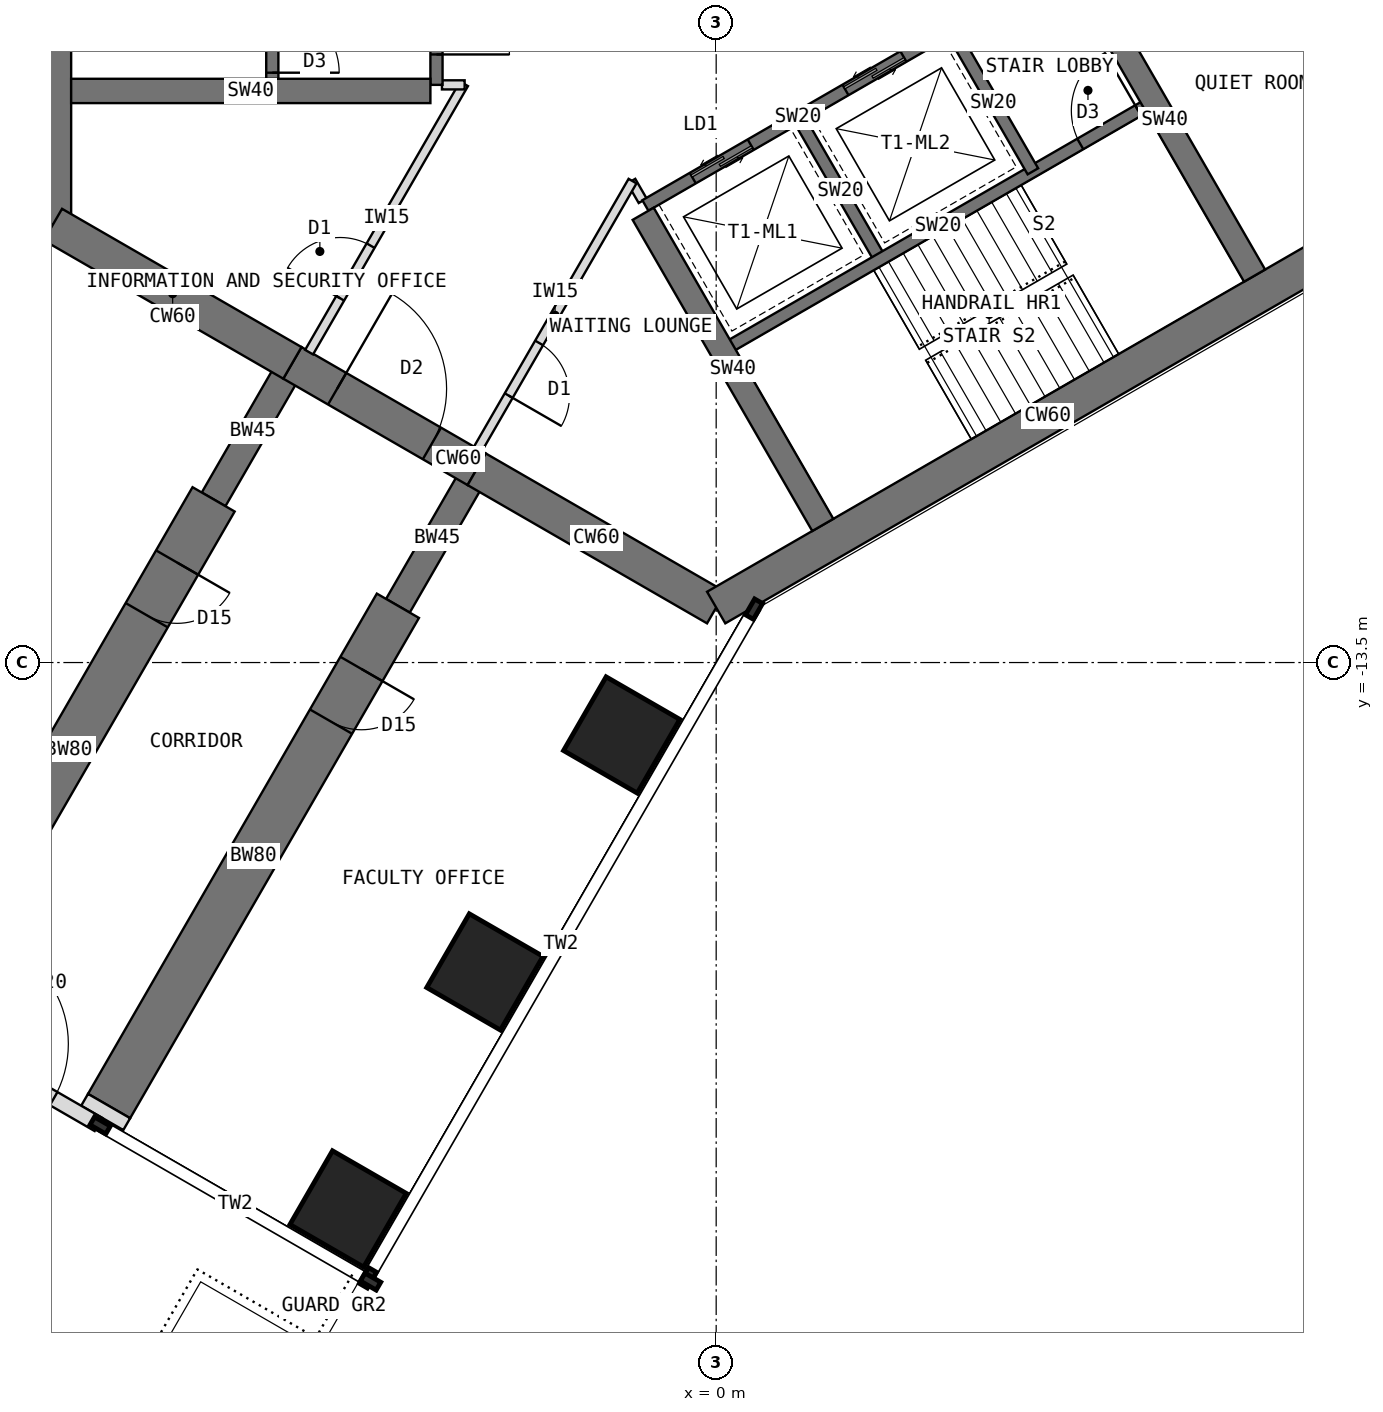
"""IFC4 building model, lengths in metres.
Left out: names, types, materials, properties, quantities, classifications, styles, units other than length and angle.
Written with IfcOpenShell. Run it as: python <this file> out.ifc"""

import sys

from ifc_helpers import new_model, si_unit, direction, frame, frame_2d, origin, origin_2d, place, context, subcontext, project, spatial, rectangle, extrude, element, fill, save


model = new_model("IFC4")
c1 = context("Model", 3, precision=1e-05, world=origin(), true_north=direction((0.0, 1.0)))
c2 = subcontext(c1, "Body", "Model", "MODEL_VIEW")
j1 = project(units=[si_unit("LENGTHUNIT", "METRE"), si_unit("PLANEANGLEUNIT", "RADIAN")], contexts=[c1])
p1 = place(None, origin())
s1 = spatial("IfcSite", under=j1, at=p1, CompositionType="ELEMENT")
p2 = place(p1, origin())
s2 = spatial("IfcBuilding", under=s1, at=p2, CompositionType="ELEMENT")
p3 = place(p2, frame((0.0, 0.0, 97.5)))
s3 = spatial("IfcBuildingStorey", under=s2, at=p3, CompositionType="ELEMENT", Elevation=97.5)
p4 = place(p3, frame((-10.908, 6.298, 0.0), z_axis=(0.0, 0.0, 1.0), x_axis=(0.0, -1.0, 0.0)))
e1 = element("IfcWall", 1, at=p4, inside=s3, PredefinedType="SHEAR", context=c2, shape_type="SweptSolid", body=[
    extrude(rectangle(XDim=12.596, YDim=0.6, at=frame_2d((6.298, 0.0))), origin(), (0.0, 0.0, 1.0), 4.0),
])
p5 = place(p3, frame((-10.908, -6.298, 0.0), z_axis=(0.0, 0.0, 1.0), x_axis=(0.866034513004, -0.499984222037, 0.0)))
e2 = element("IfcWall", 2, at=p5, inside=s3, PredefinedType="SHEAR", context=c2, shape_type="SweptSolid", body=[
    extrude(rectangle(XDim=4.548, YDim=0.6, at=frame_2d((2.274, 0.0))), origin(), (0.0, 0.0, 1.0), 4.0),
])
p6 = place(p3, frame((-6.97, -8.572, 0.0), z_axis=(0.0, 0.0, 1.0), x_axis=(0.866019471182, -0.500010275428, 0.0)))
e3 = element("IfcWall", 3, at=p6, inside=s3, PredefinedType="SHEAR", context=c2, shape_type="SweptSolid", body=[
    extrude(rectangle(XDim=3.5, YDim=0.6, at=frame_2d((1.75, 0.0))), origin(), (0.0, 0.0, 1.0), 4.0),
])
p7 = place(p6, frame((0.85, 0.0, 0.0)))
e4 = element("IfcOpeningElement", 4, at=p7, cuts=e3, PredefinedType="OPENING", context=c2, shape_type="SweptSolid", body=[
    extrude(rectangle(XDim=1.8, YDim=2.1, at=frame_2d((0.9, 1.05))), frame((0.0, 0.31, 0.0), z_axis=(0.0, -1.0, 0.0), x_axis=(1.0, 0.0, 0.0)), (0.0, 0.0, 1.0), 0.62),
])
p8 = place(p3, frame((-3.939, -10.322, 0.0), z_axis=(0.0, 0.0, 1.0), x_axis=(0.866011268655, -0.500024481964, 0.0)))
e5 = element("IfcWall", 5, at=p8, inside=s3, PredefinedType="SHEAR", context=c2, shape_type="SweptSolid", body=[
    extrude(rectangle(XDim=4.548, YDim=0.6, at=frame_2d((2.274, 0.0))), origin(), (0.0, 0.0, 1.0), 4.0),
])
p9 = place(p3, frame((0.0, -12.596, 0.0), z_axis=(0.0, 0.0, 1.0), x_axis=(0.866021940709, 0.500005998175, 0.0)))
e6 = element("IfcWall", 6, at=p9, inside=s3, PredefinedType="SHEAR", context=c2, shape_type="SweptSolid", body=[
    extrude(rectangle(XDim=12.596, YDim=0.6, at=frame_2d((6.298, 0.0))), origin(), (0.0, 0.0, 1.0), 4.0),
])
p10 = place(p3, frame((-3.939, -10.322, 0.0), z_axis=(0.0, 0.0, 1.0), x_axis=(-0.499918158782, -0.866072649678, 0.0)))
e7 = element("IfcWall", 7, at=p10, inside=s3, PredefinedType="SHEAR", context=c2, shape_type="SweptSolid", body=[
    extrude(rectangle(XDim=2.592, YDim=0.45, at=frame_2d((1.296, 0.0))), origin(), (0.0, 0.0, 1.0), 4.0),
])
p11 = place(p3, frame((-5.234, -12.566, 0.0), z_axis=(0.0, 0.0, 1.0), x_axis=(-0.499997557548, -0.86602681393, 0.0)))
e8 = element("IfcWall", 8, at=p11, inside=s3, PredefinedType="SHEAR", context=c2, shape_type="SweptSolid", body=[
    extrude(rectangle(XDim=9.5, YDim=0.8, at=frame_2d((4.75, 0.0))), origin(), (0.0, 0.0, 1.0), 4.0),
])
p12 = place(p11, frame((1.2, 0.0, 0.0)))
e9 = element("IfcOpeningElement", 9, at=p12, cuts=e8, PredefinedType="OPENING", context=c2, shape_type="SweptSolid", body=[
    extrude(rectangle(XDim=1.0, YDim=2.1, at=frame_2d((0.5, 1.05))), frame((0.0, 0.41, 0.0), z_axis=(0.0, -1.0, 0.0), x_axis=(1.0, 0.0, 0.0)), (0.0, 0.0, 1.0), 0.82),
])
p13 = place(p3, frame((-6.97, -8.572, 0.0), z_axis=(0.0, 0.0, 1.0), x_axis=(-0.499988811324, -0.866031863473, 0.0)))
e10 = element("IfcWall", 10, at=p13, inside=s3, PredefinedType="SHEAR", context=c2, shape_type="SweptSolid", body=[
    extrude(rectangle(XDim=2.592, YDim=0.45, at=frame_2d((1.296, 0.0))), origin(), (0.0, 0.0, 1.0), 4.0),
])
p14 = place(p3, frame((-8.266, -10.816, 0.0), z_axis=(0.0, 0.0, 1.0), x_axis=(-0.499997557548, -0.86602681393, 0.0)))
e11 = element("IfcWall", 11, at=p14, inside=s3, PredefinedType="SHEAR", context=c2, shape_type="SweptSolid", body=[
    extrude(rectangle(XDim=9.5, YDim=0.8, at=frame_2d((4.75, 0.0))), origin(), (0.0, 0.0, 1.0), 4.0),
])
p15 = place(p14, frame((1.2, 0.0, 0.0)))
e12 = element("IfcOpeningElement", 12, at=p15, cuts=e11, PredefinedType="OPENING", context=c2, shape_type="SweptSolid", body=[
    extrude(rectangle(XDim=1.0, YDim=2.1, at=frame_2d((0.5, 1.05))), frame((0.0, 0.41, 0.0), z_axis=(0.0, -1.0, 0.0), x_axis=(1.0, 0.0, 0.0)), (0.0, 0.0, 1.0), 0.82),
])
for number, where, z_axis, x_axis in (
    (13, (-1.554, -14.691, 0.0), (0.0, 0.0, 1.0), (0.5, 0.866, 0.0)),
    (14, (-3.804, -18.588, 0.0), (0.0, 0.0, 1.0), (0.5, 0.866, 0.0)),
    (15, (-6.054, -22.486, 0.0), (0.0, 0.0, 1.0), (0.5, 0.866, 0.0)),
):
    element("IfcColumn", number, at=place(p3, frame(where, z_axis=z_axis, x_axis=x_axis)), inside=s3, PredefinedType="COLUMN", context=c2, shape_type="SweptSolid", body=[
        extrude(rectangle(XDim=1.4, YDim=1.4, at=origin_2d()), origin(), (0.0, 0.0, 1.0), 4.0),
    ])
p16 = place(p3, frame((-13.19, -19.347, 0.0), z_axis=(0.0, 0.0, 1.0), x_axis=(0.866019471182, -0.500010275428, 0.0)))
e16 = element("IfcWall", 16, at=p16, inside=s3, PredefinedType="STANDARD", context=c2, shape_type="SweptSolid", body=[
    extrude(rectangle(XDim=3.5, YDim=0.25, at=frame_2d((1.75, 0.0))), origin(), (0.0, 0.0, 1.0), 3.8),
])
p17 = place(p16, frame((0.85, 0.0, 0.0)))
e17 = element("IfcOpeningElement", 17, at=p17, cuts=e16, PredefinedType="OPENING", context=c2, shape_type="SweptSolid", body=[
    extrude(rectangle(XDim=1.8, YDim=2.4, at=frame_2d((0.9, 1.2))), frame((0.0, 0.135, 0.0), z_axis=(0.0, -1.0, 0.0), x_axis=(1.0, 0.0, 0.0)), (0.0, 0.0, 1.0), 0.27),
])
p18 = place(p3, frame((-9.984, -20.794, 0.0), z_axis=(0.0, 0.0, 1.0), x_axis=(-0.500223362819, -0.865896406789, 0.0)))
e18 = element("IfcWall", 18, at=p18, inside=s3, PredefinedType="PARTITIONING", context=c2, shape_type="SweptSolid", body=[
    extrude(rectangle(XDim=0.225, YDim=0.8, at=frame_2d((0.113, 0.0))), origin(), (0.0, 0.0, 1.0), 3.8),
])
p19 = place(p3, frame((-4.6, 4.0, 0.0), z_axis=(0.0, 0.0, 1.0), x_axis=(0.0, -1.0, 0.0)))
e19 = element("IfcWall", 19, at=p19, inside=s3, PredefinedType="SHEAR", context=c2, shape_type="SweptSolid", body=[
    extrude(rectangle(XDim=8.0, YDim=0.2, at=frame_2d((4.0, 0.0))), origin(), (0.0, 0.0, 1.0), 4.0),
])
p20 = place(p19, frame((6.3, 0.0, 0.0)))
e20 = element("IfcOpeningElement", 20, at=p20, cuts=e19, PredefinedType="OPENING", context=c2, shape_type="SweptSolid", body=[
    extrude(rectangle(XDim=1.2, YDim=2.1, at=frame_2d((0.6, 1.05))), frame((0.0, 0.11, 0.0), z_axis=(0.0, -1.0, 0.0), x_axis=(1.0, 0.0, 0.0)), (0.0, 0.0, 1.0), 0.22),
])
p21 = place(p19, frame((0.9, 0.0, 0.0)))
e21 = element("IfcOpeningElement", 21, at=p21, cuts=e19, PredefinedType="OPENING", context=c2, shape_type="SweptSolid", body=[
    extrude(rectangle(XDim=1.1, YDim=2.2, at=frame_2d((0.55, 1.1))), frame((0.0, 0.11, 0.0), z_axis=(0.0, -1.0, 0.0), x_axis=(1.0, 0.0, 0.0)), (0.0, 0.0, 1.0), 0.22),
])
p22 = place(p3, frame((-7.3, 4.0, 0.0), z_axis=(0.0, 0.0, 1.0), x_axis=(0.0, -1.0, 0.0)))
e22 = element("IfcWall", 22, at=p22, inside=s3, PredefinedType="SHEAR", context=c2, shape_type="SweptSolid", body=[
    extrude(rectangle(XDim=8.0, YDim=0.2, at=frame_2d((4.0, 0.0))), origin(), (0.0, 0.0, 1.0), 4.0),
])
p23 = place(p22, frame((6.7, 0.0, 0.0)))
e23 = element("IfcOpeningElement", 23, at=p23, cuts=e22, PredefinedType="OPENING", context=c2, shape_type="SweptSolid", body=[
    extrude(rectangle(XDim=1.1, YDim=2.1, at=frame_2d((0.55, 1.05))), frame((0.0, 0.11, 0.0), z_axis=(0.0, -1.0, 0.0), x_axis=(1.0, 0.0, 0.0)), (0.0, 0.0, 1.0), 0.22),
])
p24 = place(p3, frame((-4.7, -4.1, 0.0), z_axis=(0.0, 0.0, 1.0), x_axis=(-1.0, 0.0, 0.0)))
e24 = element("IfcWall", 24, at=p24, inside=s3, PredefinedType="SHEAR", context=c2, shape_type="SweptSolid", body=[
    extrude(rectangle(XDim=5.908, YDim=0.4, at=frame_2d((2.954, 0.0))), origin(), (0.0, 0.0, 1.0), 4.0),
])
p25 = place(p3, frame((-1.164, -5.984, 0.0), z_axis=(0.0, 0.0, 1.0), x_axis=(0.866026010844, 0.49999894854, 0.0)))
e25 = element("IfcWall", 25, at=p25, inside=s3, PredefinedType="SHEAR", context=c2, shape_type="SweptSolid", body=[
    extrude(rectangle(XDim=8.0, YDim=0.2, at=frame_2d((4.0, 0.0))), origin(), (0.0, 0.0, 1.0), 4.0),
])
p26 = place(p25, frame((6.3, 0.0, 0.0)))
e26 = element("IfcOpeningElement", 26, at=p26, cuts=e25, PredefinedType="OPENING", context=c2, shape_type="SweptSolid", body=[
    extrude(rectangle(XDim=1.2, YDim=2.1, at=frame_2d((0.6, 1.05))), frame((0.0, 0.11, 0.0), z_axis=(0.0, -1.0, 0.0), x_axis=(1.0, 0.0, 0.0)), (0.0, 0.0, 1.0), 0.22),
])
p27 = place(p25, frame((0.9, 0.0, 0.0)))
e27 = element("IfcOpeningElement", 27, at=p27, cuts=e25, PredefinedType="OPENING", context=c2, shape_type="SweptSolid", body=[
    extrude(rectangle(XDim=1.1, YDim=2.2, at=frame_2d((0.55, 1.1))), frame((0.0, 0.11, 0.0), z_axis=(0.0, -1.0, 0.0), x_axis=(1.0, 0.0, 0.0)), (0.0, 0.0, 1.0), 0.22),
])
p28 = place(p25, frame((3.8, 0.0, 0.0)))
e28 = element("IfcOpeningElement", 28, at=p28, cuts=e25, PredefinedType="OPENING", context=c2, shape_type="SweptSolid", body=[
    extrude(rectangle(XDim=1.1, YDim=2.2, at=frame_2d((0.55, 1.1))), frame((0.0, 0.11, 0.0), z_axis=(0.0, -1.0, 0.0), x_axis=(1.0, 0.0, 0.0)), (0.0, 0.0, 1.0), 0.22),
])
p29 = place(p3, frame((1.397, -4.62, 0.0), z_axis=(0.0, 0.0, 1.0), x_axis=(0.499936506574, -0.866062058628, 0.0)))
e29 = element("IfcWall", 29, at=p29, inside=s3, PredefinedType="SHEAR", context=c2, shape_type="SweptSolid", body=[
    extrude(rectangle(XDim=2.6, YDim=0.2, at=frame_2d((1.3, 0.0))), origin(), (0.0, 0.0, 1.0), 4.0),
])
p30 = place(p3, frame((3.909, -3.17, 0.0), z_axis=(0.0, 0.0, 1.0), x_axis=(0.49997716683, -0.86603858612, 0.0)))
e30 = element("IfcWall", 30, at=p30, inside=s3, PredefinedType="SHEAR", context=c2, shape_type="SweptSolid", body=[
    extrude(rectangle(XDim=2.6, YDim=0.2, at=frame_2d((1.3, 0.0))), origin(), (0.0, 0.0, 1.0), 4.0),
])
p31 = place(p3, frame((0.186, -8.322, 0.0), z_axis=(0.0, 0.0, 1.0), x_axis=(0.866026010844, 0.49999894854, 0.0)))
e31 = element("IfcWall", 31, at=p31, inside=s3, PredefinedType="SHEAR", context=c2, shape_type="SweptSolid", body=[
    extrude(rectangle(XDim=8.0, YDim=0.2, at=frame_2d((4.0, 0.0))), origin(), (0.0, 0.0, 1.0), 4.0),
])
p32 = place(p31, frame((6.7, 0.0, 0.0)))
e32 = element("IfcOpeningElement", 32, at=p32, cuts=e31, PredefinedType="OPENING", context=c2, shape_type="SweptSolid", body=[
    extrude(rectangle(XDim=1.1, YDim=2.1, at=frame_2d((0.55, 1.05))), frame((0.0, 0.11, 0.0), z_axis=(0.0, -1.0, 0.0), x_axis=(1.0, 0.0, 0.0)), (0.0, 0.0, 1.0), 0.22),
])
p33 = place(p3, frame((5.901, -2.02, 0.0), z_axis=(0.0, 0.0, 1.0), x_axis=(0.500027676417, -0.866009424208, 0.0)))
e33 = element("IfcWall", 33, at=p33, inside=s3, PredefinedType="SHEAR", context=c2, shape_type="SweptSolid", body=[
    extrude(rectangle(XDim=5.908, YDim=0.4, at=frame_2d((2.954, 0.0))), origin(), (0.0, 0.0, 1.0), 4.0),
])
p34 = place(p3, frame((-1.201, -6.12, 0.0), z_axis=(0.0, 0.0, 1.0), x_axis=(0.49999668571, -0.866027317282, 0.0)))
e34 = element("IfcWall", 34, at=p34, inside=s3, PredefinedType="SHEAR", context=c2, shape_type="SweptSolid", body=[
    extrude(rectangle(XDim=5.908, YDim=0.4, at=frame_2d((2.954, 0.0))), origin(), (0.0, 0.0, 1.0), 4.0),
])
p35 = place(p3, frame((-1.209, -5.906, 0.0), z_axis=(0.0, 0.0, 1.0), x_axis=(-0.500081290722, 0.865978465477, 0.0)))
e35 = element("IfcWall", 35, at=p35, inside=s3, PredefinedType="PARTITIONING", context=c2, shape_type="SweptSolid", body=[
    extrude(rectangle(XDim=0.373, YDim=0.15, at=frame_2d((0.187, 0.0))), origin(), (0.0, 0.0, 1.0), 3.8),
])
p36 = place(p3, frame((-1.375, -5.583, 0.0), z_axis=(0.0, 0.0, 1.0), x_axis=(-0.500050086259, -0.865996484538, 0.0)))
e36 = element("IfcWall", 36, at=p36, inside=s3, PredefinedType="PARTITIONING", context=c2, shape_type="SweptSolid", body=[
    extrude(rectangle(XDim=5.096, YDim=0.15, at=frame_2d((2.548, 0.0))), origin(), (0.0, 0.0, 1.0), 3.8),
])
p37 = place(p36, frame((3.073, 0.0, 0.0)))
e37 = element("IfcOpeningElement", 37, at=p37, cuts=e36, PredefinedType="OPENING", context=c2, shape_type="SweptSolid", body=[
    extrude(rectangle(XDim=1.0, YDim=2.1, at=frame_2d((0.5, 1.05))), frame((0.0, 0.085, 0.0), z_axis=(0.0, -1.0, 0.0), x_axis=(1.0, 0.0, 0.0)), (0.0, 0.0, 1.0), 0.17),
])
p38 = place(p3, frame((-6.695, -8.396, 0.0), z_axis=(0.0, 0.0, 1.0), x_axis=(0.499993407537, 0.866029209911, 0.0)))
e38 = element("IfcWall", 38, at=p38, inside=s3, PredefinedType="PARTITIONING", context=c2, shape_type="SweptSolid", body=[
    extrude(rectangle(XDim=5.096, YDim=0.15, at=frame_2d((2.548, 0.0))), origin(), (0.0, 0.0, 1.0), 3.8),
])
p39 = place(p38, frame((1.023, 0.0, 0.0)))
e39 = element("IfcOpeningElement", 39, at=p39, cuts=e38, PredefinedType="OPENING", context=c2, shape_type="SweptSolid", body=[
    extrude(rectangle(XDim=1.0, YDim=2.1, at=frame_2d((0.5, 1.05))), frame((0.0, 0.085, 0.0), z_axis=(0.0, -1.0, 0.0), x_axis=(1.0, 0.0, 0.0)), (0.0, 0.0, 1.0), 0.17),
])
p40 = place(p3, frame((-4.137, -4.0, 0.0), z_axis=(0.0, 0.0, 1.0), x_axis=(-1.0, 0.0, 0.0)))
e40 = element("IfcWall", 40, at=p40, inside=s3, PredefinedType="PARTITIONING", context=c2, shape_type="SweptSolid", body=[
    extrude(rectangle(XDim=0.373, YDim=0.15, at=frame_2d((0.187, 0.0))), origin(), (0.0, 0.0, 1.0), 3.8),
])
p41 = place(p17, origin())
e41 = element("IfcDoor", 41, at=p41, inside=s3, OperationType="DOUBLE_DOOR_DOUBLE_SWING", PredefinedType="DOOR", context=c2, shape_type="SweptSolid", body=[
    extrude(rectangle(XDim=1.8, YDim=2.4, at=frame_2d((0.9, 1.2))), frame((0.0, 0.025, 0.0), z_axis=(0.0, -1.0, 0.0), x_axis=(1.0, 0.0, 0.0)), (0.0, 0.0, 1.0), 0.05),
])
fill(e17, e41)
p42 = place(p20, origin())
e42 = element("IfcDoor", 42, at=p42, inside=s3, OperationType="SINGLE_SWING_RIGHT", PredefinedType="DOOR", context=c2, shape_type="SweptSolid", body=[
    extrude(rectangle(XDim=1.2, YDim=2.1, at=frame_2d((0.6, 1.05))), frame((0.0, 0.025, 0.0), z_axis=(0.0, -1.0, 0.0), x_axis=(1.0, 0.0, 0.0)), (0.0, 0.0, 1.0), 0.05),
])
fill(e20, e42)
p43 = place(p23, origin())
e43 = element("IfcDoor", 43, at=p43, inside=s3, OperationType="SINGLE_SWING_RIGHT", PredefinedType="DOOR", context=c2, shape_type="SweptSolid", body=[
    extrude(rectangle(XDim=1.1, YDim=2.1, at=frame_2d((0.55, 1.05))), frame((0.0, 0.025, 0.0), z_axis=(0.0, -1.0, 0.0), x_axis=(1.0, 0.0, 0.0)), (0.0, 0.0, 1.0), 0.05),
])
fill(e23, e43)
p44 = place(p27, origin())
e44 = element("IfcDoor", 44, at=p44, inside=s3, OperationType="DOUBLE_DOOR_SLIDING", PredefinedType="DOOR", context=c2, shape_type="SweptSolid", body=[
    extrude(rectangle(XDim=1.1, YDim=2.2, at=frame_2d((0.55, 1.1))), frame((0.0, 0.025, 0.0), z_axis=(0.0, -1.0, 0.0), x_axis=(1.0, 0.0, 0.0)), (0.0, 0.0, 1.0), 0.05),
])
fill(e27, e44)
p45 = place(p28, origin())
e45 = element("IfcDoor", 45, at=p45, inside=s3, OperationType="DOUBLE_DOOR_SLIDING", PredefinedType="DOOR", context=c2, shape_type="SweptSolid", body=[
    extrude(rectangle(XDim=1.1, YDim=2.2, at=frame_2d((0.55, 1.1))), frame((0.0, 0.025, 0.0), z_axis=(0.0, -1.0, 0.0), x_axis=(1.0, 0.0, 0.0)), (0.0, 0.0, 1.0), 0.05),
])
fill(e28, e45)
p46 = place(p32, origin())
e46 = element("IfcDoor", 46, at=p46, inside=s3, OperationType="SINGLE_SWING_RIGHT", PredefinedType="DOOR", context=c2, shape_type="SweptSolid", body=[
    extrude(rectangle(XDim=1.1, YDim=2.1, at=frame_2d((0.55, 1.05))), frame((0.0, 0.025, 0.0), z_axis=(0.0, -1.0, 0.0), x_axis=(1.0, 0.0, 0.0)), (0.0, 0.0, 1.0), 0.05),
])
fill(e32, e46)
p47 = place(p7, origin())
e47 = element("IfcDoor", 47, at=p47, inside=s3, OperationType="DOUBLE_DOOR_DOUBLE_SWING", PredefinedType="DOOR", context=c2, shape_type="SweptSolid", body=[
    extrude(rectangle(XDim=1.72, YDim=2.06, at=frame_2d((0.9, 1.03))), frame((0.0, 0.025, 0.0), z_axis=(0.0, -1.0, 0.0), x_axis=(1.0, 0.0, 0.0)), (0.0, 0.0, 1.0), 0.05),
    extrude(rectangle(XDim=0.04, YDim=2.1, at=frame_2d((0.02, 1.05))), frame((0.0, 0.3, 0.0), z_axis=(0.0, -1.0, 0.0), x_axis=(1.0, 0.0, 0.0)), (0.0, 0.0, 1.0), 0.6),
    extrude(rectangle(XDim=0.04, YDim=2.1, at=frame_2d((1.78, 1.05))), frame((0.0, 0.3, 0.0), z_axis=(0.0, -1.0, 0.0), x_axis=(1.0, 0.0, 0.0)), (0.0, 0.0, 1.0), 0.6),
    extrude(rectangle(XDim=1.72, YDim=0.04, at=frame_2d((0.9, 2.08))), frame((0.0, 0.3, 0.0), z_axis=(0.0, -1.0, 0.0), x_axis=(1.0, 0.0, 0.0)), (0.0, 0.0, 1.0), 0.6),
])
fill(e4, e47)
p48 = place(p39, origin())
e48 = element("IfcDoor", 48, at=p48, inside=s3, OperationType="SINGLE_SWING_LEFT", PredefinedType="DOOR", context=c2, shape_type="SweptSolid", body=[
    extrude(rectangle(XDim=1.0, YDim=2.1, at=frame_2d((0.5, 1.05))), frame((0.0, 0.025, 0.0), z_axis=(0.0, -1.0, 0.0), x_axis=(1.0, 0.0, 0.0)), (0.0, 0.0, 1.0), 0.05),
])
fill(e39, e48)
p49 = place(p37, origin())
e49 = element("IfcDoor", 49, at=p49, inside=s3, OperationType="SINGLE_SWING_RIGHT", PredefinedType="DOOR", context=c2, shape_type="SweptSolid", body=[
    extrude(rectangle(XDim=1.0, YDim=2.1, at=frame_2d((0.5, 1.05))), frame((0.0, 0.025, 0.0), z_axis=(0.0, -1.0, 0.0), x_axis=(1.0, 0.0, 0.0)), (0.0, 0.0, 1.0), 0.05),
])
fill(e37, e49)
p50 = place(p12, origin())
e50 = element("IfcDoor", 50, at=p50, inside=s3, OperationType="SINGLE_SWING_LEFT", PredefinedType="DOOR", context=c2, shape_type="SweptSolid", body=[
    extrude(rectangle(XDim=0.92, YDim=2.06, at=frame_2d((0.5, 1.03))), frame((0.0, 0.025, 0.0), z_axis=(0.0, -1.0, 0.0), x_axis=(1.0, 0.0, 0.0)), (0.0, 0.0, 1.0), 0.05),
    extrude(rectangle(XDim=0.04, YDim=2.1, at=frame_2d((0.02, 1.05))), frame((0.0, 0.4, 0.0), z_axis=(0.0, -1.0, 0.0), x_axis=(1.0, 0.0, 0.0)), (0.0, 0.0, 1.0), 0.8),
    extrude(rectangle(XDim=0.04, YDim=2.1, at=frame_2d((0.98, 1.05))), frame((0.0, 0.4, 0.0), z_axis=(0.0, -1.0, 0.0), x_axis=(1.0, 0.0, 0.0)), (0.0, 0.0, 1.0), 0.8),
    extrude(rectangle(XDim=0.92, YDim=0.04, at=frame_2d((0.5, 2.08))), frame((0.0, 0.4, 0.0), z_axis=(0.0, -1.0, 0.0), x_axis=(1.0, 0.0, 0.0)), (0.0, 0.0, 1.0), 0.8),
])
fill(e9, e50)
p51 = place(p15, origin())
e51 = element("IfcDoor", 51, at=p51, inside=s3, OperationType="SINGLE_SWING_LEFT", PredefinedType="DOOR", context=c2, shape_type="SweptSolid", body=[
    extrude(rectangle(XDim=0.92, YDim=2.06, at=frame_2d((0.5, 1.03))), frame((0.0, 0.025, 0.0), z_axis=(0.0, -1.0, 0.0), x_axis=(1.0, 0.0, 0.0)), (0.0, 0.0, 1.0), 0.05),
    extrude(rectangle(XDim=0.04, YDim=2.1, at=frame_2d((0.02, 1.05))), frame((0.0, 0.4, 0.0), z_axis=(0.0, -1.0, 0.0), x_axis=(1.0, 0.0, 0.0)), (0.0, 0.0, 1.0), 0.8),
    extrude(rectangle(XDim=0.04, YDim=2.1, at=frame_2d((0.98, 1.05))), frame((0.0, 0.4, 0.0), z_axis=(0.0, -1.0, 0.0), x_axis=(1.0, 0.0, 0.0)), (0.0, 0.0, 1.0), 0.8),
    extrude(rectangle(XDim=0.92, YDim=0.04, at=frame_2d((0.5, 2.08))), frame((0.0, 0.4, 0.0), z_axis=(0.0, -1.0, 0.0), x_axis=(1.0, 0.0, 0.0)), (0.0, 0.0, 1.0), 0.8),
])
fill(e12, e51)
save(model, sys.argv[1])
